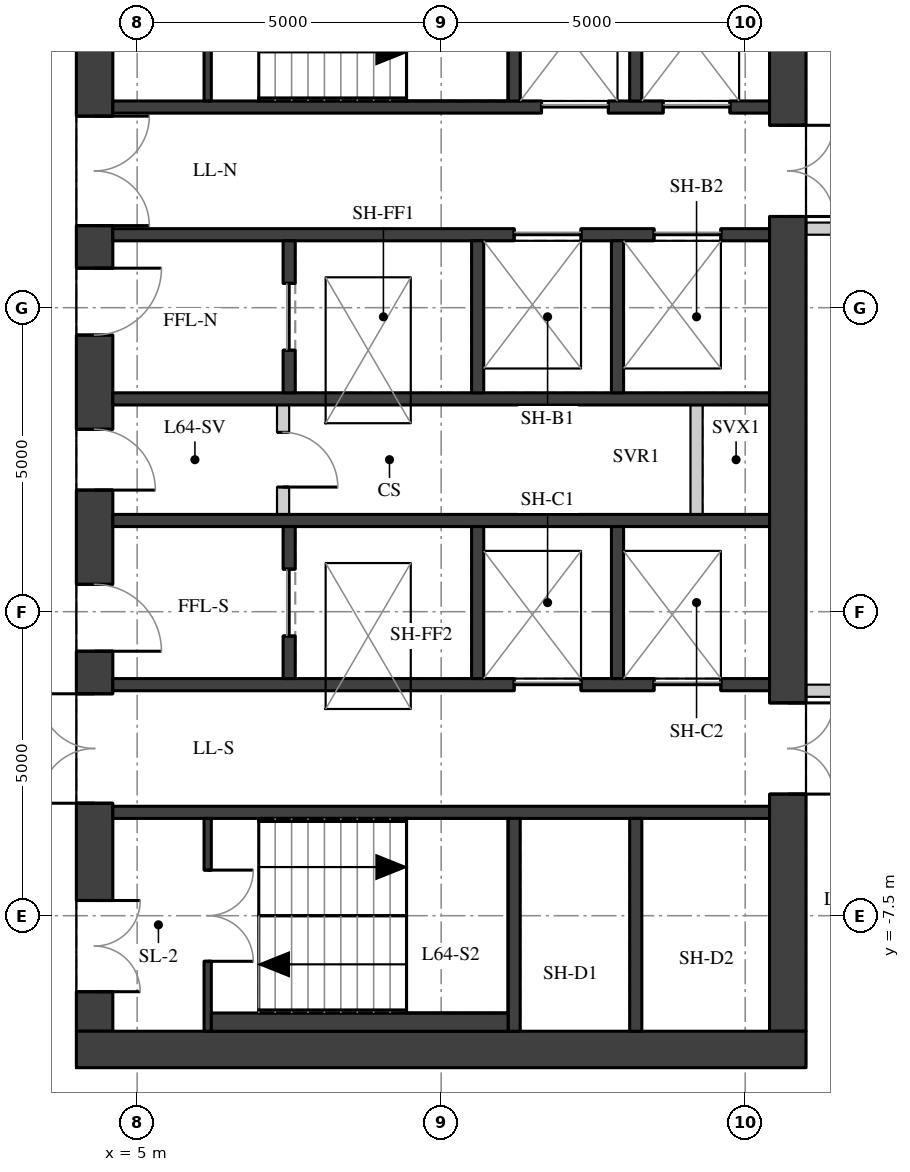
"""IFC4 building model, lengths in metres.
Left out: names, types, materials, properties, quantities, classifications, styles, units other than length and angle.
Written with IfcOpenShell. Run it as: python <this file> out.ifc"""

import sys

from ifc_helpers import new_model, si_unit, direction, frame, frame_2d, origin, place, context, subcontext, project, spatial, rectangle, extrude, element, fill, save


model = new_model("IFC4")
c1 = context("Model", 3, precision=1e-05, world=origin(), true_north=direction((0.0, 1.0)))
c2 = subcontext(c1, "Body", "Model", "MODEL_VIEW")
j1 = project(units=[si_unit("LENGTHUNIT", "METRE"), si_unit("PLANEANGLEUNIT", "RADIAN")], contexts=[c1])
p1 = place(None, origin())
s1 = spatial("IfcSite", under=j1, at=p1, CompositionType="ELEMENT")
p2 = place(p1, origin())
s2 = spatial("IfcBuilding", under=s1, at=p2, CompositionType="ELEMENT")
p3 = place(p2, frame((0.0, 0.0, 225.5)))
s3 = spatial("IfcBuildingStorey", under=s2, at=p3, CompositionType="ELEMENT", Elevation=225.5)
p4 = place(p3, frame((4.3, -9.4, 0.0), z_axis=(0.0, 0.0, 1.0), x_axis=(0.0, 1.0, 0.0)))
e1 = element("IfcWall", 1, at=p4, inside=s3, PredefinedType="SHEAR", context=c2, shape_type="SweptSolid", body=[
    extrude(rectangle(XDim=18.8, YDim=0.6, at=frame_2d((9.4, 0.0))), origin(), (0.0, 0.0, 1.0), 2.85),
])
p5 = place(p4, frame((0.65, 0.0, 0.0)))
e2 = element("IfcOpeningElement", 2, at=p5, cuts=e1, PredefinedType="OPENING", context=c2, shape_type="SweptSolid", body=[
    extrude(rectangle(XDim=1.5, YDim=2.1, at=frame_2d((0.75, 1.05))), frame((0.0, 0.31, 0.0), z_axis=(0.0, -1.0, 0.0), x_axis=(1.0, 0.0, 0.0)), (0.0, 0.0, 1.0), 0.62),
])
p6 = place(p4, frame((3.75, 0.0, 0.0)))
e3 = element("IfcOpeningElement", 3, at=p6, cuts=e1, PredefinedType="OPENING", context=c2, shape_type="SweptSolid", body=[
    extrude(rectangle(XDim=1.8, YDim=2.1, at=frame_2d((0.9, 1.05))), frame((0.0, 0.31, 0.0), z_axis=(0.0, -1.0, 0.0), x_axis=(1.0, 0.0, 0.0)), (0.0, 0.0, 1.0), 0.62),
])
p7 = place(p4, frame((6.25, 0.0, 0.0)))
e4 = element("IfcOpeningElement", 4, at=p7, cuts=e1, PredefinedType="OPENING", context=c2, shape_type="SweptSolid", body=[
    extrude(rectangle(XDim=1.1, YDim=2.1, at=frame_2d((0.55, 1.05))), frame((0.0, 0.31, 0.0), z_axis=(0.0, -1.0, 0.0), x_axis=(1.0, 0.0, 0.0)), (0.0, 0.0, 1.0), 0.62),
])
p8 = place(p4, frame((8.9, 0.0, 0.0)))
e5 = element("IfcOpeningElement", 5, at=p8, cuts=e1, PredefinedType="OPENING", context=c2, shape_type="SweptSolid", body=[
    extrude(rectangle(XDim=1.0, YDim=2.1, at=frame_2d((0.5, 1.05))), frame((0.0, 0.31, 0.0), z_axis=(0.0, -1.0, 0.0), x_axis=(1.0, 0.0, 0.0)), (0.0, 0.0, 1.0), 0.62),
])
p9 = place(p4, frame((11.45, 0.0, 0.0)))
e6 = element("IfcOpeningElement", 6, at=p9, cuts=e1, PredefinedType="OPENING", context=c2, shape_type="SweptSolid", body=[
    extrude(rectangle(XDim=1.1, YDim=2.1, at=frame_2d((0.55, 1.05))), frame((0.0, 0.31, 0.0), z_axis=(0.0, -1.0, 0.0), x_axis=(1.0, 0.0, 0.0)), (0.0, 0.0, 1.0), 0.62),
])
p10 = place(p4, frame((13.25, 0.0, 0.0)))
e7 = element("IfcOpeningElement", 7, at=p10, cuts=e1, PredefinedType="OPENING", context=c2, shape_type="SweptSolid", body=[
    extrude(rectangle(XDim=1.8, YDim=2.1, at=frame_2d((0.9, 1.05))), frame((0.0, 0.31, 0.0), z_axis=(0.0, -1.0, 0.0), x_axis=(1.0, 0.0, 0.0)), (0.0, 0.0, 1.0), 0.62),
])
p11 = place(p4, frame((16.65, 0.0, 0.0)))
e8 = element("IfcOpeningElement", 8, at=p11, cuts=e1, PredefinedType="OPENING", context=c2, shape_type="SweptSolid", body=[
    extrude(rectangle(XDim=1.5, YDim=2.1, at=frame_2d((0.75, 1.05))), frame((0.0, 0.31, 0.0), z_axis=(0.0, -1.0, 0.0), x_axis=(1.0, 0.0, 0.0)), (0.0, 0.0, 1.0), 0.62),
])
p12 = place(p3, frame((15.7, -9.4, 0.0), z_axis=(0.0, 0.0, 1.0), x_axis=(0.0, 1.0, 0.0)))
e9 = element("IfcWall", 9, at=p12, inside=s3, PredefinedType="SHEAR", context=c2, shape_type="SweptSolid", body=[
    extrude(rectangle(XDim=18.8, YDim=0.6, at=frame_2d((9.4, 0.0))), origin(), (0.0, 0.0, 1.0), 2.85),
])
p13 = place(p12, frame((13.4, 0.0, 0.0)))
e10 = element("IfcOpeningElement", 10, at=p13, cuts=e9, PredefinedType="OPENING", context=c2, shape_type="SweptSolid", body=[
    extrude(rectangle(XDim=1.5, YDim=2.1, at=frame_2d((0.75, 1.05))), frame((0.0, 0.31, 0.0), z_axis=(0.0, -1.0, 0.0), x_axis=(1.0, 0.0, 0.0)), (0.0, 0.0, 1.0), 0.62),
])
p14 = place(p12, frame((3.9, 0.0, 0.0)))
e11 = element("IfcOpeningElement", 11, at=p14, cuts=e9, PredefinedType="OPENING", context=c2, shape_type="SweptSolid", body=[
    extrude(rectangle(XDim=1.5, YDim=2.1, at=frame_2d((0.75, 1.05))), frame((0.0, 0.31, 0.0), z_axis=(0.0, -1.0, 0.0), x_axis=(1.0, 0.0, 0.0)), (0.0, 0.0, 1.0), 0.62),
])
p15 = place(p3, frame((4.0, -9.7, 0.0), z_axis=(0.0, 0.0, 1.0), x_axis=(1.0, 0.0, 0.0)))
e12 = element("IfcWall", 12, at=p15, inside=s3, PredefinedType="SHEAR", context=c2, shape_type="SweptSolid", body=[
    extrude(rectangle(XDim=12.0, YDim=0.6, at=frame_2d((6.0, 0.0))), origin(), (0.0, 0.0, 1.0), 2.85),
])
p16 = place(p3, frame((4.6, 5.8, 0.0), z_axis=(0.0, 0.0, 1.0), x_axis=(1.0, 0.0, 0.0)))
e13 = element("IfcWall", 13, at=p16, inside=s3, PredefinedType="SHEAR", context=c2, shape_type="SweptSolid", body=[
    extrude(rectangle(XDim=10.8, YDim=0.2, at=frame_2d((5.4, 0.0))), origin(), (0.0, 0.0, 1.0), 2.85),
])
p17 = place(p16, frame((7.05, 0.0, 0.0)))
e14 = element("IfcOpeningElement", 14, at=p17, cuts=e13, PredefinedType="OPENING", context=c2, shape_type="SweptSolid", body=[
    extrude(rectangle(XDim=1.1, YDim=2.1, at=frame_2d((0.55, 1.05))), frame((0.0, 0.11, 0.0), z_axis=(0.0, -1.0, 0.0), x_axis=(1.0, 0.0, 0.0)), (0.0, 0.0, 1.0), 0.22),
])
p18 = place(p16, frame((9.05, 0.0, 0.0)))
e15 = element("IfcOpeningElement", 15, at=p18, cuts=e13, PredefinedType="OPENING", context=c2, shape_type="SweptSolid", body=[
    extrude(rectangle(XDim=1.1, YDim=2.1, at=frame_2d((0.55, 1.05))), frame((0.0, 0.11, 0.0), z_axis=(0.0, -1.0, 0.0), x_axis=(1.0, 0.0, 0.0)), (0.0, 0.0, 1.0), 0.22),
])
p19 = place(p3, frame((4.6, 3.7, 0.0), z_axis=(0.0, 0.0, 1.0), x_axis=(1.0, 0.0, 0.0)))
e16 = element("IfcWall", 16, at=p19, inside=s3, PredefinedType="SHEAR", context=c2, shape_type="SweptSolid", body=[
    extrude(rectangle(XDim=10.8, YDim=0.2, at=frame_2d((5.4, 0.0))), origin(), (0.0, 0.0, 1.0), 2.85),
])
p20 = place(p19, frame((6.6, 0.0, 0.0)))
e17 = element("IfcOpeningElement", 17, at=p20, cuts=e16, PredefinedType="OPENING", context=c2, shape_type="SweptSolid", body=[
    extrude(rectangle(XDim=1.1, YDim=2.1, at=frame_2d((0.55, 1.05))), frame((0.0, 0.11, 0.0), z_axis=(0.0, -1.0, 0.0), x_axis=(1.0, 0.0, 0.0)), (0.0, 0.0, 1.0), 0.22),
])
p21 = place(p19, frame((8.9, 0.0, 0.0)))
e18 = element("IfcOpeningElement", 18, at=p21, cuts=e16, PredefinedType="OPENING", context=c2, shape_type="SweptSolid", body=[
    extrude(rectangle(XDim=1.1, YDim=2.1, at=frame_2d((0.55, 1.05))), frame((0.0, 0.11, 0.0), z_axis=(0.0, -1.0, 0.0), x_axis=(1.0, 0.0, 0.0)), (0.0, 0.0, 1.0), 0.22),
])
for number, where, z_axis, x_axis in (
    (19, (4.6, 1.0, 0.0), (0.0, 0.0, 1.0), (1.0, 0.0, 0.0)),
    (20, (4.6, -1.0, 0.0), (0.0, 0.0, 1.0), (1.0, 0.0, 0.0)),
):
    element("IfcWall", number, at=place(p3, frame(where, z_axis=z_axis, x_axis=x_axis)), inside=s3, PredefinedType="SHEAR", context=c2, shape_type="SweptSolid", body=[
        extrude(rectangle(XDim=10.8, YDim=0.2, at=frame_2d((5.4, 0.0))), origin(), (0.0, 0.0, 1.0), 2.85),
    ])
p22 = place(p3, frame((4.6, -3.7, 0.0), z_axis=(0.0, 0.0, 1.0), x_axis=(1.0, 0.0, 0.0)))
e21 = element("IfcWall", 21, at=p22, inside=s3, PredefinedType="SHEAR", context=c2, shape_type="SweptSolid", body=[
    extrude(rectangle(XDim=10.8, YDim=0.2, at=frame_2d((5.4, 0.0))), origin(), (0.0, 0.0, 1.0), 2.85),
])
p23 = place(p22, frame((6.6, 0.0, 0.0)))
e22 = element("IfcOpeningElement", 22, at=p23, cuts=e21, PredefinedType="OPENING", context=c2, shape_type="SweptSolid", body=[
    extrude(rectangle(XDim=1.1, YDim=2.1, at=frame_2d((0.55, 1.05))), frame((0.0, 0.11, 0.0), z_axis=(0.0, -1.0, 0.0), x_axis=(1.0, 0.0, 0.0)), (0.0, 0.0, 1.0), 0.22),
])
p24 = place(p22, frame((8.9, 0.0, 0.0)))
e23 = element("IfcOpeningElement", 23, at=p24, cuts=e21, PredefinedType="OPENING", context=c2, shape_type="SweptSolid", body=[
    extrude(rectangle(XDim=1.1, YDim=2.1, at=frame_2d((0.55, 1.05))), frame((0.0, 0.11, 0.0), z_axis=(0.0, -1.0, 0.0), x_axis=(1.0, 0.0, 0.0)), (0.0, 0.0, 1.0), 0.22),
])
p25 = place(p3, frame((4.6, -5.8, 0.0), z_axis=(0.0, 0.0, 1.0), x_axis=(1.0, 0.0, 0.0)))
e24 = element("IfcWall", 24, at=p25, inside=s3, PredefinedType="SHEAR", context=c2, shape_type="SweptSolid", body=[
    extrude(rectangle(XDim=10.8, YDim=0.2, at=frame_2d((5.4, 0.0))), origin(), (0.0, 0.0, 1.0), 2.85),
])
for number, where, z_axis, x_axis in (
    (25, (11.2, 5.9, 0.0), (0.0, 0.0, 1.0), (0.0, 1.0, 0.0)),
    (26, (11.2, -9.4, 0.0), (0.0, 0.0, 1.0), (0.0, 1.0, 0.0)),
    (27, (13.2, 5.9, 0.0), (0.0, 0.0, 1.0), (0.0, 1.0, 0.0)),
    (28, (13.2, -9.4, 0.0), (0.0, 0.0, 1.0), (0.0, 1.0, 0.0)),
):
    element("IfcWall", number, at=place(p3, frame(where, z_axis=z_axis, x_axis=x_axis)), inside=s3, PredefinedType="SHEAR", context=c2, shape_type="SweptSolid", body=[
        extrude(rectangle(XDim=3.5, YDim=0.2, at=frame_2d((1.75, 0.0))), origin(), (0.0, 0.0, 1.0), 2.85),
    ])
p26 = place(p3, frame((7.5, 1.1, 0.0), z_axis=(0.0, 0.0, 1.0), x_axis=(0.0, 1.0, 0.0)))
e29 = element("IfcWall", 29, at=p26, inside=s3, PredefinedType="SHEAR", context=c2, shape_type="SweptSolid", body=[
    extrude(rectangle(XDim=2.5, YDim=0.2, at=frame_2d((1.25, 0.0))), origin(), (0.0, 0.0, 1.0), 2.85),
])
p27 = place(p26, frame((0.7, 0.0, 0.0)))
e30 = element("IfcOpeningElement", 30, at=p27, cuts=e29, PredefinedType="OPENING", context=c2, shape_type="SweptSolid", body=[
    extrude(rectangle(XDim=1.1, YDim=2.1, at=frame_2d((0.55, 1.05))), frame((0.0, 0.11, 0.0), z_axis=(0.0, -1.0, 0.0), x_axis=(1.0, 0.0, 0.0)), (0.0, 0.0, 1.0), 0.22),
])
p28 = place(p3, frame((7.5, -3.6, 0.0), z_axis=(0.0, 0.0, 1.0), x_axis=(0.0, 1.0, 0.0)))
e31 = element("IfcWall", 31, at=p28, inside=s3, PredefinedType="SHEAR", context=c2, shape_type="SweptSolid", body=[
    extrude(rectangle(XDim=2.5, YDim=0.2, at=frame_2d((1.25, 0.0))), origin(), (0.0, 0.0, 1.0), 2.85),
])
p29 = place(p28, frame((0.7, 0.0, 0.0)))
e32 = element("IfcOpeningElement", 32, at=p29, cuts=e31, PredefinedType="OPENING", context=c2, shape_type="SweptSolid", body=[
    extrude(rectangle(XDim=1.1, YDim=2.1, at=frame_2d((0.55, 1.05))), frame((0.0, 0.11, 0.0), z_axis=(0.0, -1.0, 0.0), x_axis=(1.0, 0.0, 0.0)), (0.0, 0.0, 1.0), 0.22),
])
for number, where, z_axis, x_axis in (
    (33, (10.6, 1.1, 0.0), (0.0, 0.0, 1.0), (0.0, 1.0, 0.0)),
    (34, (10.6, -3.6, 0.0), (0.0, 0.0, 1.0), (0.0, 1.0, 0.0)),
    (35, (12.9, 1.1, 0.0), (0.0, 0.0, 1.0), (0.0, 1.0, 0.0)),
    (36, (12.9, -3.6, 0.0), (0.0, 0.0, 1.0), (0.0, 1.0, 0.0)),
):
    element("IfcWall", number, at=place(p3, frame(where, z_axis=z_axis, x_axis=x_axis)), inside=s3, PredefinedType="SHEAR", context=c2, shape_type="SweptSolid", body=[
        extrude(rectangle(XDim=2.5, YDim=0.2, at=frame_2d((1.25, 0.0))), origin(), (0.0, 0.0, 1.0), 2.85),
    ])
p30 = place(p3, frame((6.16, 5.9, 0.0), z_axis=(0.0, 0.0, 1.0), x_axis=(0.0, 1.0, 0.0)))
e37 = element("IfcWall", 37, at=p30, inside=s3, PredefinedType="SHEAR", context=c2, shape_type="SweptSolid", body=[
    extrude(rectangle(XDim=3.5, YDim=0.12, at=frame_2d((1.75, 0.0))), origin(), (0.0, 0.0, 1.0), 2.85),
])
p31 = place(p30, frame((0.85, 0.0, 0.0)))
e38 = element("IfcOpeningElement", 38, at=p31, cuts=e37, PredefinedType="OPENING", context=c2, shape_type="SweptSolid", body=[
    extrude(rectangle(XDim=1.5, YDim=2.1, at=frame_2d((0.75, 1.05))), frame((0.0, 0.07, 0.0), z_axis=(0.0, -1.0, 0.0), x_axis=(1.0, 0.0, 0.0)), (0.0, 0.0, 1.0), 0.14),
])
p32 = place(p3, frame((6.16, -9.4, 0.0), z_axis=(0.0, 0.0, 1.0), x_axis=(0.0, 1.0, 0.0)))
e39 = element("IfcWall", 39, at=p32, inside=s3, PredefinedType="SHEAR", context=c2, shape_type="SweptSolid", body=[
    extrude(rectangle(XDim=3.5, YDim=0.12, at=frame_2d((1.75, 0.0))), origin(), (0.0, 0.0, 1.0), 2.85),
])
p33 = place(p32, frame((1.15, 0.0, 0.0)))
e40 = element("IfcOpeningElement", 40, at=p33, cuts=e39, PredefinedType="OPENING", context=c2, shape_type="SweptSolid", body=[
    extrude(rectangle(XDim=1.5, YDim=2.1, at=frame_2d((0.75, 1.05))), frame((0.0, 0.07, 0.0), z_axis=(0.0, -1.0, 0.0), x_axis=(1.0, 0.0, 0.0)), (0.0, 0.0, 1.0), 0.14),
])
p34 = place(p3, frame((7.4, -0.9, 0.0), z_axis=(0.0, 0.0, 1.0), x_axis=(0.0, 1.0, 0.0)))
e41 = element("IfcWall", 41, at=p34, inside=s3, PredefinedType="PARTITIONING", context=c2, shape_type="SweptSolid", body=[
    extrude(rectangle(XDim=1.8, YDim=0.2, at=frame_2d((0.9, 0.0))), origin(), (0.0, 0.0, 1.0), 2.85),
])
p35 = place(p34, frame((0.45, 0.0, 0.0)))
e42 = element("IfcOpeningElement", 42, at=p35, cuts=e41, PredefinedType="OPENING", context=c2, shape_type="SweptSolid", body=[
    extrude(rectangle(XDim=0.9, YDim=2.1, at=frame_2d((0.45, 1.05))), frame((0.0, 0.11, 0.0), z_axis=(0.0, -1.0, 0.0), x_axis=(1.0, 0.0, 0.0)), (0.0, 0.0, 1.0), 0.22),
])
p36 = place(p3, frame((14.2, -0.9, 0.0), z_axis=(0.0, 0.0, 1.0), x_axis=(0.0, 1.0, 0.0)))
e43 = element("IfcWall", 43, at=p36, inside=s3, PredefinedType="PARTITIONING", context=c2, shape_type="SweptSolid", body=[
    extrude(rectangle(XDim=1.8, YDim=0.2, at=frame_2d((0.9, 0.0))), origin(), (0.0, 0.0, 1.0), 2.85),
])
p37 = place(p3, frame((6.22, -9.25, 0.0), z_axis=(0.0, 0.0, 1.0), x_axis=(1.0, 0.0, 0.0)))
e44 = element("IfcWall", 44, at=p37, inside=s3, PredefinedType="PARTITIONING", context=c2, shape_type="SweptSolid", body=[
    extrude(rectangle(XDim=4.88, YDim=0.3, at=frame_2d((2.44, 0.0))), origin(), (0.0, 0.0, 1.0), 2.85),
])
p38 = place(p3, frame((17.6, 3.8, 0.0), z_axis=(0.0, 0.0, 1.0), x_axis=(-1.0, 0.0, 0.0)))
e45 = element("IfcWall", 45, at=p38, inside=s3, PredefinedType="PARTITIONING", context=c2, shape_type="SweptSolid", body=[
    extrude(rectangle(XDim=1.596, YDim=0.2, at=frame_2d((0.798, 0.0))), origin(), (0.0, 0.0, 1.0), 2.85),
])
p39 = place(p3, frame((16.004, -3.8, 0.0), z_axis=(0.0, 0.0, 1.0), x_axis=(1.0, 0.0, 0.0)))
e46 = element("IfcWall", 46, at=p39, inside=s3, PredefinedType="PARTITIONING", context=c2, shape_type="SweptSolid", body=[
    extrude(rectangle(XDim=1.596, YDim=0.2, at=frame_2d((0.798, 0.0))), origin(), (0.0, 0.0, 1.0), 2.3),
])
p40 = place(p5, origin())
e47 = element("IfcDoor", 47, at=p40, inside=s3, OperationType="DOUBLE_DOOR_SINGLE_SWING", PredefinedType="DOOR", context=c2, shape_type="SweptSolid", body=[
    extrude(rectangle(XDim=1.5, YDim=2.1, at=frame_2d((0.75, 1.05))), frame((0.0, 0.025, 0.0), z_axis=(0.0, -1.0, 0.0), x_axis=(1.0, 0.0, 0.0)), (0.0, 0.0, 1.0), 0.05),
])
fill(e2, e47)
p41 = place(p6, origin())
e48 = element("IfcDoor", 48, at=p41, inside=s3, OperationType="DOUBLE_DOOR_SINGLE_SWING", PredefinedType="DOOR", context=c2, shape_type="SweptSolid", body=[
    extrude(rectangle(XDim=1.8, YDim=2.1, at=frame_2d((0.9, 1.05))), frame((0.0, 0.025, 0.0), z_axis=(0.0, -1.0, 0.0), x_axis=(1.0, 0.0, 0.0)), (0.0, 0.0, 1.0), 0.05),
])
fill(e3, e48)
p42 = place(p7, origin())
e49 = element("IfcDoor", 49, at=p42, inside=s3, OperationType="SINGLE_SWING_RIGHT", PredefinedType="DOOR", context=c2, shape_type="SweptSolid", body=[
    extrude(rectangle(XDim=1.1, YDim=2.1, at=frame_2d((0.55, 1.05))), frame((0.0, 0.025, 0.0), z_axis=(0.0, -1.0, 0.0), x_axis=(1.0, 0.0, 0.0)), (0.0, 0.0, 1.0), 0.05),
])
fill(e4, e49)
p43 = place(p8, origin())
e50 = element("IfcDoor", 50, at=p43, inside=s3, OperationType="SINGLE_SWING_RIGHT", PredefinedType="DOOR", context=c2, shape_type="SweptSolid", body=[
    extrude(rectangle(XDim=1.0, YDim=2.1, at=frame_2d((0.5, 1.05))), frame((0.0, 0.025, 0.0), z_axis=(0.0, -1.0, 0.0), x_axis=(1.0, 0.0, 0.0)), (0.0, 0.0, 1.0), 0.05),
])
fill(e5, e50)
p44 = place(p9, origin())
e51 = element("IfcDoor", 51, at=p44, inside=s3, OperationType="SINGLE_SWING_LEFT", PredefinedType="DOOR", context=c2, shape_type="SweptSolid", body=[
    extrude(rectangle(XDim=1.1, YDim=2.1, at=frame_2d((0.55, 1.05))), frame((0.0, 0.025, 0.0), z_axis=(0.0, -1.0, 0.0), x_axis=(1.0, 0.0, 0.0)), (0.0, 0.0, 1.0), 0.05),
])
fill(e6, e51)
p45 = place(p10, origin())
e52 = element("IfcDoor", 52, at=p45, inside=s3, OperationType="DOUBLE_DOOR_SINGLE_SWING", PredefinedType="DOOR", context=c2, shape_type="SweptSolid", body=[
    extrude(rectangle(XDim=1.8, YDim=2.1, at=frame_2d((0.9, 1.05))), frame((0.0, 0.025, 0.0), z_axis=(0.0, -1.0, 0.0), x_axis=(1.0, 0.0, 0.0)), (0.0, 0.0, 1.0), 0.05),
])
fill(e7, e52)
p46 = place(p13, origin())
e53 = element("IfcDoor", 53, at=p46, inside=s3, OperationType="DOUBLE_DOOR_SINGLE_SWING", PredefinedType="DOOR", context=c2, shape_type="SweptSolid", body=[
    extrude(rectangle(XDim=1.5, YDim=2.1, at=frame_2d((0.75, 1.05))), frame((0.0, 0.025, 0.0), z_axis=(0.0, -1.0, 0.0), x_axis=(1.0, 0.0, 0.0)), (0.0, 0.0, 1.0), 0.05),
])
fill(e10, e53)
p47 = place(p14, origin())
e54 = element("IfcDoor", 54, at=p47, inside=s3, OperationType="DOUBLE_DOOR_SINGLE_SWING", PredefinedType="DOOR", context=c2, shape_type="SweptSolid", body=[
    extrude(rectangle(XDim=1.5, YDim=2.1, at=frame_2d((0.75, 1.05))), frame((0.0, 0.025, 0.0), z_axis=(0.0, -1.0, 0.0), x_axis=(1.0, 0.0, 0.0)), (0.0, 0.0, 1.0), 0.05),
])
fill(e11, e54)
p48 = place(p33, origin())
e55 = element("IfcDoor", 55, at=p48, inside=s3, OperationType="DOUBLE_DOOR_SINGLE_SWING", PredefinedType="DOOR", context=c2, shape_type="SweptSolid", body=[
    extrude(rectangle(XDim=1.5, YDim=2.1, at=frame_2d((0.75, 1.05))), frame((0.0, 0.025, 0.0), z_axis=(0.0, -1.0, 0.0), x_axis=(1.0, 0.0, 0.0)), (0.0, 0.0, 1.0), 0.05),
])
fill(e40, e55)
p49 = place(p17, origin())
e56 = element("IfcDoor", 56, at=p49, inside=s3, OperationType="DOUBLE_DOOR_SLIDING", PredefinedType="DOOR", context=c2, shape_type="SweptSolid", body=[
    extrude(rectangle(XDim=1.1, YDim=2.1, at=frame_2d((0.55, 1.05))), frame((0.0, 0.025, 0.0), z_axis=(0.0, -1.0, 0.0), x_axis=(1.0, 0.0, 0.0)), (0.0, 0.0, 1.0), 0.05),
])
fill(e14, e56)
p50 = place(p18, origin())
e57 = element("IfcDoor", 57, at=p50, inside=s3, OperationType="DOUBLE_DOOR_SLIDING", PredefinedType="DOOR", context=c2, shape_type="SweptSolid", body=[
    extrude(rectangle(XDim=1.1, YDim=2.1, at=frame_2d((0.55, 1.05))), frame((0.0, 0.025, 0.0), z_axis=(0.0, -1.0, 0.0), x_axis=(1.0, 0.0, 0.0)), (0.0, 0.0, 1.0), 0.05),
])
fill(e15, e57)
p51 = place(p20, origin())
e58 = element("IfcDoor", 58, at=p51, inside=s3, OperationType="DOUBLE_DOOR_SLIDING", PredefinedType="DOOR", context=c2, shape_type="SweptSolid", body=[
    extrude(rectangle(XDim=1.1, YDim=2.1, at=frame_2d((0.55, 1.05))), frame((0.0, 0.025, 0.0), z_axis=(0.0, -1.0, 0.0), x_axis=(1.0, 0.0, 0.0)), (0.0, 0.0, 1.0), 0.05),
])
fill(e17, e58)
p52 = place(p21, origin())
e59 = element("IfcDoor", 59, at=p52, inside=s3, OperationType="DOUBLE_DOOR_SLIDING", PredefinedType="DOOR", context=c2, shape_type="SweptSolid", body=[
    extrude(rectangle(XDim=1.1, YDim=2.1, at=frame_2d((0.55, 1.05))), frame((0.0, 0.025, 0.0), z_axis=(0.0, -1.0, 0.0), x_axis=(1.0, 0.0, 0.0)), (0.0, 0.0, 1.0), 0.05),
])
fill(e18, e59)
p53 = place(p23, origin())
e60 = element("IfcDoor", 60, at=p53, inside=s3, OperationType="DOUBLE_DOOR_SLIDING", PredefinedType="DOOR", context=c2, shape_type="SweptSolid", body=[
    extrude(rectangle(XDim=1.1, YDim=2.1, at=frame_2d((0.55, 1.05))), frame((0.0, 0.025, 0.0), z_axis=(0.0, -1.0, 0.0), x_axis=(1.0, 0.0, 0.0)), (0.0, 0.0, 1.0), 0.05),
])
fill(e22, e60)
p54 = place(p24, origin())
e61 = element("IfcDoor", 61, at=p54, inside=s3, OperationType="DOUBLE_DOOR_SLIDING", PredefinedType="DOOR", context=c2, shape_type="SweptSolid", body=[
    extrude(rectangle(XDim=1.1, YDim=2.1, at=frame_2d((0.55, 1.05))), frame((0.0, 0.025, 0.0), z_axis=(0.0, -1.0, 0.0), x_axis=(1.0, 0.0, 0.0)), (0.0, 0.0, 1.0), 0.05),
])
fill(e23, e61)
p55 = place(p27, origin())
e62 = element("IfcDoor", 62, at=p55, inside=s3, OperationType="DOUBLE_DOOR_SLIDING", PredefinedType="DOOR", context=c2, shape_type="SweptSolid", body=[
    extrude(rectangle(XDim=1.1, YDim=2.1, at=frame_2d((0.55, 1.05))), frame((0.0, 0.025, 0.0), z_axis=(0.0, -1.0, 0.0), x_axis=(1.0, 0.0, 0.0)), (0.0, 0.0, 1.0), 0.05),
])
fill(e30, e62)
p56 = place(p29, origin())
e63 = element("IfcDoor", 63, at=p56, inside=s3, OperationType="DOUBLE_DOOR_SLIDING", PredefinedType="DOOR", context=c2, shape_type="SweptSolid", body=[
    extrude(rectangle(XDim=1.1, YDim=2.1, at=frame_2d((0.55, 1.05))), frame((0.0, 0.025, 0.0), z_axis=(0.0, -1.0, 0.0), x_axis=(1.0, 0.0, 0.0)), (0.0, 0.0, 1.0), 0.05),
])
fill(e32, e63)
p57 = place(p35, origin())
e64 = element("IfcDoor", 64, at=p57, inside=s3, OperationType="SINGLE_SWING_RIGHT", PredefinedType="DOOR", context=c2, shape_type="SweptSolid", body=[
    extrude(rectangle(XDim=0.9, YDim=2.1, at=frame_2d((0.45, 1.05))), frame((0.0, 0.025, 0.0), z_axis=(0.0, -1.0, 0.0), x_axis=(1.0, 0.0, 0.0)), (0.0, 0.0, 1.0), 0.05),
])
fill(e42, e64)
save(model, sys.argv[1])
